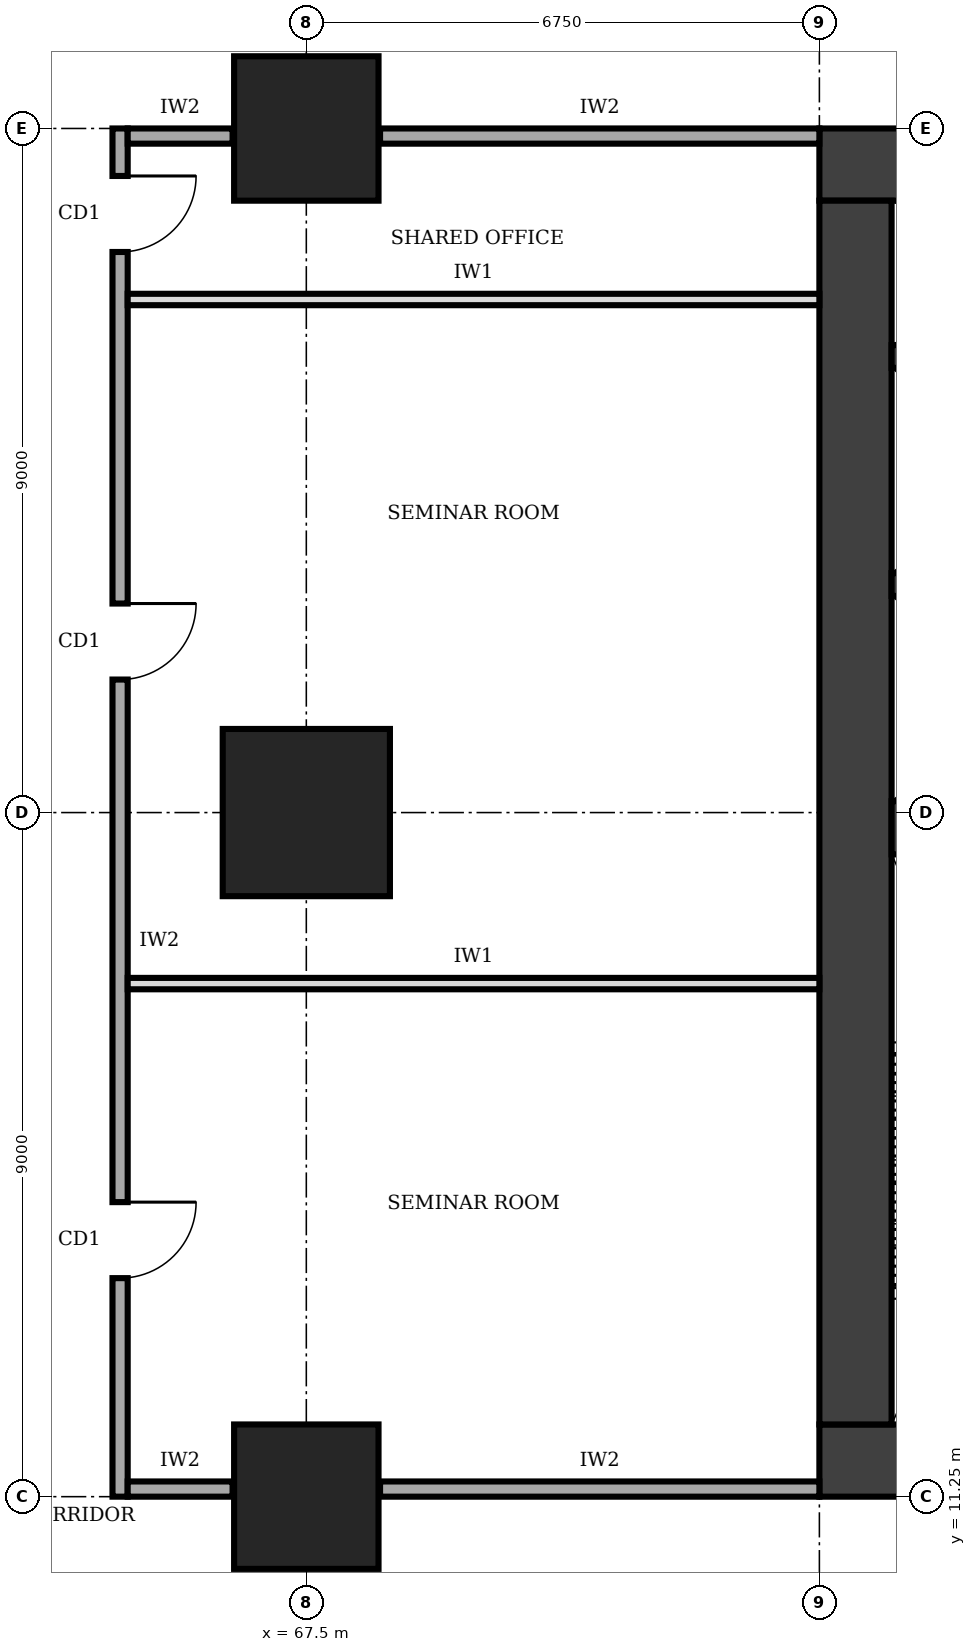
"""IFC4 building model, lengths in metres.
Left out: names, types, materials, properties, quantities, classifications, styles, units other than length and angle.
Written with IfcOpenShell. Run it as: python <this file> out.ifc"""

import sys

from ifc_helpers import new_model, si_unit, direction, frame, frame_2d, origin, origin_2d, place, context, subcontext, project, spatial, rectangle, extrude, element, fill, save


model = new_model("IFC4")
c1 = context("Model", 3, precision=1e-05, world=origin(), true_north=direction((0.0, 1.0)))
c2 = subcontext(c1, "Body", "Model", "MODEL_VIEW")
j1 = project(units=[si_unit("LENGTHUNIT", "METRE"), si_unit("PLANEANGLEUNIT", "RADIAN")], contexts=[c1])
p1 = place(None, origin())
s1 = spatial("IfcSite", under=j1, at=p1, CompositionType="ELEMENT")
p2 = place(p1, origin())
s2 = spatial("IfcBuilding", under=s1, at=p2, CompositionType="ELEMENT")
p3 = place(p2, frame((0.0, 0.0, 145.0)))
s3 = spatial("IfcBuildingStorey", under=s2, at=p3, CompositionType="ELEMENT", Elevation=145.0)
p4 = place(p3, frame((74.25, 11.725, 0.0), z_axis=(0.0, 0.0, 1.0), x_axis=(1.0, 0.0, 0.0)))
e1 = element("IfcWall", 1, at=p4, inside=s3, PredefinedType="SHEAR", context=c2, shape_type="SweptSolid", body=[
    extrude(rectangle(XDim=13.5, YDim=0.95, at=frame_2d((6.75, 0.0))), origin(), (0.0, 0.0, 1.0), 4.0),
])
p5 = place(p4, frame((4.75, 0.0, 0.0)))
e2 = element("IfcOpeningElement", 2, at=p5, cuts=e1, PredefinedType="OPENING", context=c2, shape_type="SweptSolid", body=[
    extrude(rectangle(XDim=1.0, YDim=2.1, at=frame_2d((0.5, 1.05))), frame((0.0, 0.485, 0.0), z_axis=(0.0, -1.0, 0.0), x_axis=(1.0, 0.0, 0.0)), (0.0, 0.0, 1.0), 0.97),
])
p6 = place(p3, frame((87.75, 28.775, 0.0), z_axis=(0.0, 0.0, 1.0), x_axis=(-1.0, 0.0, 0.0)))
e3 = element("IfcWall", 3, at=p6, inside=s3, PredefinedType="SHEAR", context=c2, shape_type="SweptSolid", body=[
    extrude(rectangle(XDim=13.5, YDim=0.95, at=frame_2d((6.75, 0.0))), origin(), (0.0, 0.0, 1.0), 4.0),
])
p7 = place(p6, frame((4.75, 0.0, 0.0)))
e4 = element("IfcOpeningElement", 4, at=p7, cuts=e3, PredefinedType="OPENING", context=c2, shape_type="SweptSolid", body=[
    extrude(rectangle(XDim=1.8, YDim=2.1, at=frame_2d((0.9, 1.05))), frame((0.0, 0.485, 0.0), z_axis=(0.0, -1.0, 0.0), x_axis=(1.0, 0.0, 0.0)), (0.0, 0.0, 1.0), 0.97),
])
p8 = place(p3, frame((74.725, 28.3, 0.0), z_axis=(0.0, 0.0, 1.0), x_axis=(0.0, -1.0, 0.0)))
e5 = element("IfcWall", 5, at=p8, inside=s3, PredefinedType="SHEAR", context=c2, shape_type="SweptSolid", body=[
    extrude(rectangle(XDim=16.1, YDim=0.95, at=frame_2d((8.05, 0.0))), origin(), (0.0, 0.0, 1.0), 4.0),
])
p9 = place(p3, frame((75.2, 20.05, 0.0), z_axis=(0.0, 0.0, 1.0), x_axis=(1.0, 0.0, 0.0)))
e6 = element("IfcWall", 6, at=p9, inside=s3, PredefinedType="SHEAR", context=c2, shape_type="SweptSolid", body=[
    extrude(rectangle(XDim=3.4, YDim=0.7, at=frame_2d((1.7, 0.0))), origin(), (0.0, 0.0, 1.0), 4.0),
])
for number, where, z_axis, x_axis in (
    (7, (75.2, 23.25, 0.0), (0.0, 0.0, 1.0), (1.0, 0.0, 0.0)),
    (8, (75.2, 26.25, 0.0), (0.0, 0.0, 1.0), (1.0, 0.0, 0.0)),
):
    element("IfcWall", number, at=place(p3, frame(where, z_axis=z_axis, x_axis=x_axis)), inside=s3, PredefinedType="SHEAR", context=c2, shape_type="SweptSolid", body=[
        extrude(rectangle(XDim=3.4, YDim=0.3, at=frame_2d((1.7, 0.0))), origin(), (0.0, 0.0, 1.0), 4.0),
    ])
p10 = place(p3, frame((67.5, 11.25, 0.0), z_axis=(0.0, 0.0, 1.0), x_axis=(1.0, 0.0, 0.0)))
e9 = element("IfcColumn", 9, at=p10, inside=s3, PredefinedType="COLUMN", context=c2, shape_type="SweptSolid", body=[
    extrude(rectangle(XDim=1.9, YDim=1.9, at=origin_2d()), origin(), (0.0, 0.0, 1.0), 4.0),
])
p11 = place(p3, frame((67.5, 20.25, 0.0), z_axis=(0.0, 0.0, 1.0), x_axis=(1.0, 0.0, 0.0)))
e10 = element("IfcColumn", 10, at=p11, inside=s3, PredefinedType="COLUMN", context=c2, shape_type="SweptSolid", body=[
    extrude(rectangle(XDim=2.2, YDim=2.2, at=origin_2d()), origin(), (0.0, 0.0, 1.0), 4.0),
])
p12 = place(p3, frame((67.5, 29.25, 0.0), z_axis=(0.0, 0.0, 1.0), x_axis=(1.0, 0.0, 0.0)))
e11 = element("IfcColumn", 11, at=p12, inside=s3, PredefinedType="COLUMN", context=c2, shape_type="SweptSolid", body=[
    extrude(rectangle(XDim=1.9, YDim=1.9, at=origin_2d()), origin(), (0.0, 0.0, 1.0), 4.0),
])
p13 = place(p3, frame((65.05, 29.25, 0.0), z_axis=(0.0, 0.0, 1.0), x_axis=(0.0, -1.0, 0.0)))
e12 = element("IfcWall", 12, at=p13, inside=s3, PredefinedType="SOLIDWALL", context=c2, shape_type="SweptSolid", body=[
    extrude(rectangle(XDim=18.0, YDim=0.2, at=frame_2d((9.0, 0.0))), origin(), (0.0, 0.0, 1.0), 3.75),
])
p14 = place(p13, frame((14.125, 0.0, 0.0)))
e13 = element("IfcOpeningElement", 13, at=p14, cuts=e12, PredefinedType="OPENING", context=c2, shape_type="SweptSolid", body=[
    extrude(rectangle(XDim=1.0, YDim=2.1, at=frame_2d((0.5, 1.05))), frame((0.0, 0.11, 0.0), z_axis=(0.0, -1.0, 0.0), x_axis=(1.0, 0.0, 0.0)), (0.0, 0.0, 1.0), 0.22),
])
p15 = place(p13, frame((6.25, 0.0, 0.0)))
e14 = element("IfcOpeningElement", 14, at=p15, cuts=e12, PredefinedType="OPENING", context=c2, shape_type="SweptSolid", body=[
    extrude(rectangle(XDim=1.0, YDim=2.1, at=frame_2d((0.5, 1.05))), frame((0.0, 0.11, 0.0), z_axis=(0.0, -1.0, 0.0), x_axis=(1.0, 0.0, 0.0)), (0.0, 0.0, 1.0), 0.22),
])
p16 = place(p13, frame((0.625, 0.0, 0.0)))
e15 = element("IfcOpeningElement", 15, at=p16, cuts=e12, PredefinedType="OPENING", context=c2, shape_type="SweptSolid", body=[
    extrude(rectangle(XDim=1.0, YDim=2.1, at=frame_2d((0.5, 1.05))), frame((0.0, 0.11, 0.0), z_axis=(0.0, -1.0, 0.0), x_axis=(1.0, 0.0, 0.0)), (0.0, 0.0, 1.0), 0.22),
])
p17 = place(p3, frame((65.15, 11.35, 0.0), z_axis=(0.0, 0.0, 1.0), x_axis=(1.0, 0.0, 0.0)))
e16 = element("IfcWall", 16, at=p17, inside=s3, PredefinedType="SOLIDWALL", context=c2, shape_type="SweptSolid", body=[
    extrude(rectangle(XDim=1.38, YDim=0.2, at=frame_2d((0.69, 0.0))), origin(), (0.0, 0.0, 1.0), 2.85),
])
p18 = place(p3, frame((68.47, 11.35, 0.0), z_axis=(0.0, 0.0, 1.0), x_axis=(1.0, 0.0, 0.0)))
e17 = element("IfcWall", 17, at=p18, inside=s3, PredefinedType="SOLIDWALL", context=c2, shape_type="SweptSolid", body=[
    extrude(rectangle(XDim=5.78, YDim=0.2, at=frame_2d((2.89, 0.0))), origin(), (0.0, 0.0, 1.0), 2.85),
])
p19 = place(p3, frame((65.15, 29.15, 0.0), z_axis=(0.0, 0.0, 1.0), x_axis=(1.0, 0.0, 0.0)))
e18 = element("IfcWall", 18, at=p19, inside=s3, PredefinedType="SOLIDWALL", context=c2, shape_type="SweptSolid", body=[
    extrude(rectangle(XDim=1.38, YDim=0.2, at=frame_2d((0.69, 0.0))), origin(), (0.0, 0.0, 1.0), 2.85),
])
p20 = place(p3, frame((68.47, 29.15, 0.0), z_axis=(0.0, 0.0, 1.0), x_axis=(1.0, 0.0, 0.0)))
e19 = element("IfcWall", 19, at=p20, inside=s3, PredefinedType="SOLIDWALL", context=c2, shape_type="SweptSolid", body=[
    extrude(rectangle(XDim=5.78, YDim=0.2, at=frame_2d((2.89, 0.0))), origin(), (0.0, 0.0, 1.0), 2.85),
])
for number, where, z_axis, x_axis in (
    (20, (65.15, 18.0, 0.0), (0.0, 0.0, 1.0), (1.0, 0.0, 0.0)),
    (21, (65.15, 27.0, 0.0), (0.0, 0.0, 1.0), (1.0, 0.0, 0.0)),
):
    element("IfcWall", number, at=place(p3, frame(where, z_axis=z_axis, x_axis=x_axis)), inside=s3, PredefinedType="PARTITIONING", context=c2, shape_type="SweptSolid", body=[
        extrude(rectangle(XDim=9.1, YDim=0.15, at=frame_2d((4.55, 0.0))), origin(), (0.0, 0.0, 1.0), 3.75),
    ])
p21 = place(p14, origin())
e22 = element("IfcDoor", 22, at=p21, inside=s3, OperationType="SINGLE_SWING_LEFT", PredefinedType="DOOR", context=c2, shape_type="SweptSolid", body=[
    extrude(rectangle(XDim=1.0, YDim=2.1, at=frame_2d((0.5, 1.05))), frame((0.0, 0.025, 0.0), z_axis=(0.0, -1.0, 0.0), x_axis=(1.0, 0.0, 0.0)), (0.0, 0.0, 1.0), 0.05),
])
fill(e13, e22)
p22 = place(p15, origin())
e23 = element("IfcDoor", 23, at=p22, inside=s3, OperationType="SINGLE_SWING_LEFT", PredefinedType="DOOR", context=c2, shape_type="SweptSolid", body=[
    extrude(rectangle(XDim=1.0, YDim=2.1, at=frame_2d((0.5, 1.05))), frame((0.0, 0.025, 0.0), z_axis=(0.0, -1.0, 0.0), x_axis=(1.0, 0.0, 0.0)), (0.0, 0.0, 1.0), 0.05),
])
fill(e14, e23)
p23 = place(p16, origin())
e24 = element("IfcDoor", 24, at=p23, inside=s3, OperationType="SINGLE_SWING_LEFT", PredefinedType="DOOR", context=c2, shape_type="SweptSolid", body=[
    extrude(rectangle(XDim=1.0, YDim=2.1, at=frame_2d((0.5, 1.05))), frame((0.0, 0.025, 0.0), z_axis=(0.0, -1.0, 0.0), x_axis=(1.0, 0.0, 0.0)), (0.0, 0.0, 1.0), 0.05),
])
fill(e15, e24)
save(model, sys.argv[1])
